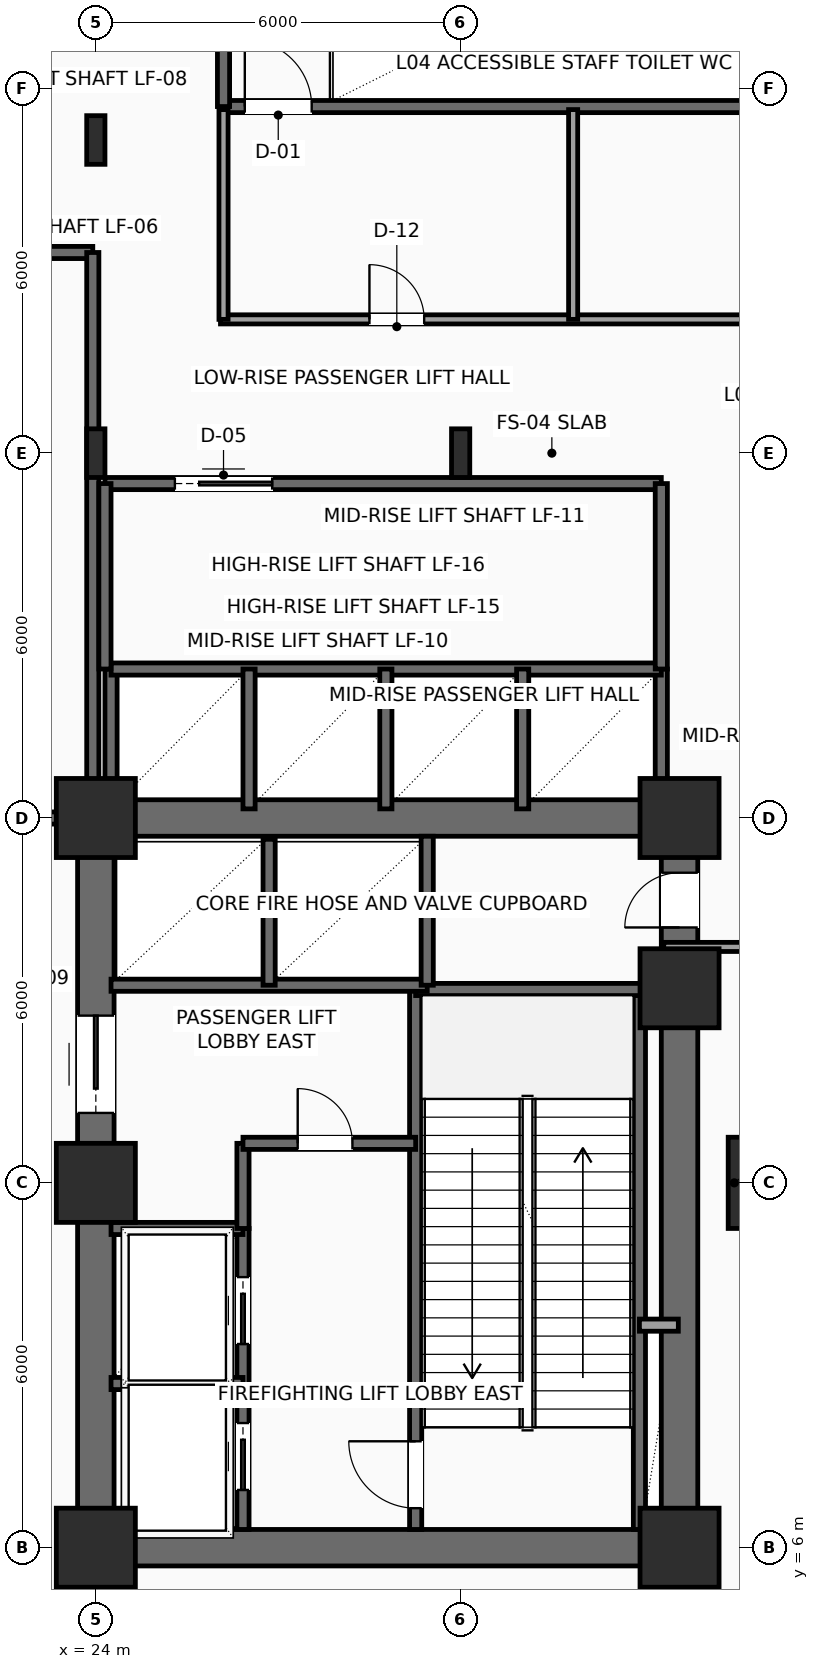
"""IFC4 building model, lengths in metres.
Left out: names, types, materials, properties, quantities, classifications, styles, units other than length and angle.
Written with IfcOpenShell. Run it as: python <this file> out.ifc"""

import sys

from ifc_helpers import new_model, si_unit, direction, frame, frame_2d, origin, origin_2d, place, context, subcontext, project, spatial, rectangle, i_section, extrude, element, fill, save


model = new_model("IFC4")
c1 = context("Model", 3, precision=1e-05, world=origin(), true_north=direction((0.0, 1.0)))
c2 = subcontext(c1, "Body", "Model", "MODEL_VIEW")
j1 = project(units=[si_unit("LENGTHUNIT", "METRE"), si_unit("PLANEANGLEUNIT", "RADIAN")], contexts=[c1])
p1 = place(None, origin())
s1 = spatial("IfcSite", under=j1, at=p1, CompositionType="ELEMENT")
p2 = place(p1, origin())
s2 = spatial("IfcBuilding", under=s1, at=p2, CompositionType="ELEMENT")
p3 = place(p2, frame((0.0, 0.0, 21.9)))
s3 = spatial("IfcBuildingStorey", under=s2, at=p3, CompositionType="ELEMENT", Elevation=21.9)
for number, where, z_axis, x_axis in (
    (1, (24.0, 6.0, 0.0), (0.0, 0.0, 1.0), (1.0, 0.0, 0.0)),
    (2, (24.0, 12.0, 0.0), (0.0, 0.0, 1.0), (1.0, 0.0, 0.0)),
    (3, (24.0, 18.0, 0.0), (0.0, 0.0, 1.0), (1.0, 0.0, 0.0)),
    (4, (33.6, 6.0, 0.0), (0.0, 0.0, 1.0), (1.0, 0.0, 0.0)),
    (5, (33.6, 15.2, 0.0), (0.0, 0.0, 1.0), (1.0, 0.0, 0.0)),
    (6, (33.6, 18.0, 0.0), (0.0, 0.0, 1.0), (1.0, 0.0, 0.0)),
):
    element("IfcColumn", number, at=place(p3, frame(where, z_axis=z_axis, x_axis=x_axis)), inside=s3, PredefinedType="COLUMN", context=c2, shape_type="SweptSolid", body=[
        extrude(rectangle(XDim=1.3, YDim=1.3, at=origin_2d()), origin(), (0.0, 0.0, 1.0), 5.7),
    ])
for number, where, z_axis, x_axis in (
    (7, (24.0, 24.0, 0.0), (0.0, 0.0, 1.0), (1.0, 0.0, 0.0)),
    (8, (24.0, 29.15, 0.0), (0.0, 0.0, 1.0), (1.0, 0.0, 0.0)),
    (9, (30.0, 24.0, 0.0), (0.0, 0.0, 1.0), (1.0, 0.0, 0.0)),
):
    element("IfcColumn", number, at=place(p3, frame(where, z_axis=z_axis, x_axis=x_axis)), inside=s3, PredefinedType="COLUMN", context=c2, shape_type="SweptSolid", body=[
        extrude(i_section(OverallWidth=0.3, OverallDepth=0.8, WebThickness=0.018, FlangeThickness=0.033, FilletRadius=0.03, at=origin_2d()), origin(), (0.0, 0.0, 1.0), 5.35),
    ])
p4 = place(p3, frame((35.15, 12.0, 0.0), z_axis=(0.0, 0.0, 1.0), x_axis=(1.0, 0.0, 0.0)))
e10 = element("IfcColumn", 10, at=p4, inside=s3, PredefinedType="COLUMN", context=c2, shape_type="SweptSolid", body=[
    extrude(rectangle(XDim=1.5, YDim=1.5, at=origin_2d()), origin(), (0.0, 0.0, 1.0), 5.35),
])
for number, where, z_axis, x_axis in (
    (11, (24.0, 6.0, 0.0), (0.0, 0.0, 1.0), (1.0, 0.0, 0.0)),
    (12, (24.0, 18.0, 0.0), (0.0, 0.0, 1.0), (1.0, 0.0, 0.0)),
):
    element("IfcWall", number, at=place(p3, frame(where, z_axis=z_axis, x_axis=x_axis)), inside=s3, PredefinedType="SHEAR", context=c2, shape_type="SweptSolid", body=[
        extrude(rectangle(XDim=9.6, YDim=0.6, at=frame_2d((4.8, 0.0))), origin(), (0.0, 0.0, 1.0), 5.35),
    ])
p5 = place(p3, frame((24.0, 6.0, 0.0), z_axis=(0.0, 0.0, 1.0), x_axis=(0.0, 1.0, 0.0)))
e13 = element("IfcWall", 13, at=p5, inside=s3, PredefinedType="SHEAR", context=c2, shape_type="SweptSolid", body=[
    extrude(rectangle(XDim=12.0, YDim=0.6, at=frame_2d((6.0, 0.0))), origin(), (0.0, 0.0, 1.0), 5.35),
])
p6 = place(p5, frame((7.15, 0.0, 0.0)))
e14 = element("IfcOpeningElement", 14, at=p6, cuts=e13, PredefinedType="OPENING", context=c2, shape_type="SweptSolid", body=[
    extrude(rectangle(XDim=1.6, YDim=2.3, at=frame_2d((0.8, 1.15))), frame((0.0, 0.31, 0.0), z_axis=(0.0, -1.0, 0.0), x_axis=(1.0, 0.0, 0.0)), (0.0, 0.0, 1.0), 0.62),
])
p7 = place(p3, frame((33.6, 6.0, 0.0), z_axis=(0.0, 0.0, 1.0), x_axis=(0.0, 1.0, 0.0)))
e15 = element("IfcWall", 15, at=p7, inside=s3, PredefinedType="SHEAR", context=c2, shape_type="SweptSolid", body=[
    extrude(rectangle(XDim=12.0, YDim=0.6, at=frame_2d((6.0, 0.0))), origin(), (0.0, 0.0, 1.0), 5.35),
])
p8 = place(p7, frame((10.2, 0.0, 0.0)))
e16 = element("IfcOpeningElement", 16, at=p8, cuts=e15, PredefinedType="OPENING", context=c2, shape_type="SweptSolid", body=[
    extrude(rectangle(XDim=0.9, YDim=2.15, at=frame_2d((0.45, 1.075))), frame((0.0, 0.31, 0.0), z_axis=(0.0, -1.0, 0.0), x_axis=(1.0, 0.0, 0.0)), (0.0, 0.0, 1.0), 0.62),
])
p9 = place(p3, frame((29.26, 6.3, 0.0), z_axis=(0.0, 0.0, 1.0), x_axis=(0.0, 1.0, 0.0)))
e17 = element("IfcWall", 17, at=p9, inside=s3, PredefinedType="SHEAR", context=c2, shape_type="SweptSolid", body=[
    extrude(rectangle(XDim=8.88, YDim=0.2, at=frame_2d((4.44, 0.0))), origin(), (0.0, 0.0, 1.0), 5.35),
])
p10 = place(p9, frame((0.35, 0.0, 0.0)))
e18 = element("IfcOpeningElement", 18, at=p10, cuts=e17, PredefinedType="OPENING", context=c2, shape_type="SweptSolid", body=[
    extrude(rectangle(XDim=1.1, YDim=2.2, at=frame_2d((0.55, 1.1))), frame((0.0, 0.11, 0.0), z_axis=(0.0, -1.0, 0.0), x_axis=(1.0, 0.0, 0.0)), (0.0, 0.0, 1.0), 0.22),
])
p11 = place(p3, frame((32.94, 6.3, 0.0), z_axis=(0.0, 0.0, 1.0), x_axis=(0.0, 1.0, 0.0)))
e19 = element("IfcWall", 19, at=p11, inside=s3, PredefinedType="SHEAR", context=c2, shape_type="SweptSolid", body=[
    extrude(rectangle(XDim=8.88, YDim=0.2, at=frame_2d((4.44, 0.0))), origin(), (0.0, 0.0, 1.0), 5.35),
])
p12 = place(p3, frame((29.26, 15.18, 0.0), z_axis=(0.0, 0.0, 1.0), x_axis=(1.0, 0.0, 0.0)))
e20 = element("IfcWall", 20, at=p12, inside=s3, PredefinedType="SHEAR", context=c2, shape_type="SweptSolid", body=[
    extrude(rectangle(XDim=4.04, YDim=0.2, at=frame_2d((2.02, 0.0))), origin(), (0.0, 0.0, 1.0), 5.35),
])
p13 = place(p3, frame((26.42, 6.3, 0.0), z_axis=(0.0, 0.0, 1.0), x_axis=(0.0, 1.0, 0.0)))
e21 = element("IfcWall", 21, at=p13, inside=s3, PredefinedType="SHEAR", context=c2, shape_type="SweptSolid", body=[
    extrude(rectangle(XDim=4.95, YDim=0.2, at=frame_2d((2.475, 0.0))), origin(), (0.0, 0.0, 1.0), 5.35),
])
p14 = place(p13, frame((0.65, 0.0, 0.0)))
e22 = element("IfcOpeningElement", 22, at=p14, cuts=e21, PredefinedType="OPENING", context=c2, shape_type="SweptSolid", body=[
    extrude(rectangle(XDim=1.1, YDim=2.2, at=frame_2d((0.55, 1.1))), frame((0.0, 0.11, 0.0), z_axis=(0.0, -1.0, 0.0), x_axis=(1.0, 0.0, 0.0)), (0.0, 0.0, 1.0), 0.22),
])
p15 = place(p13, frame((3.05, 0.0, 0.0)))
e23 = element("IfcOpeningElement", 23, at=p15, cuts=e21, PredefinedType="OPENING", context=c2, shape_type="SweptSolid", body=[
    extrude(rectangle(XDim=1.1, YDim=2.2, at=frame_2d((0.55, 1.1))), frame((0.0, 0.11, 0.0), z_axis=(0.0, -1.0, 0.0), x_axis=(1.0, 0.0, 0.0)), (0.0, 0.0, 1.0), 0.22),
])
for number, where, z_axis, x_axis in (
    (24, (24.25, 8.7, 0.0), (0.0, 0.0, 1.0), (1.0, 0.0, 0.0)),
    (25, (24.25, 11.25, 0.0), (0.0, 0.0, 1.0), (1.0, 0.0, 0.0)),
):
    element("IfcWall", number, at=place(p3, frame(where, z_axis=z_axis, x_axis=x_axis)), inside=s3, PredefinedType="SHEAR", context=c2, shape_type="SweptSolid", body=[
        extrude(rectangle(XDim=2.17, YDim=0.2, at=frame_2d((1.085, 0.0))), origin(), (0.0, 0.0, 1.0), 5.35),
    ])
p16 = place(p3, frame((26.42, 11.25, 0.0), z_axis=(0.0, 0.0, 1.0), x_axis=(0.0, 1.0, 0.0)))
e26 = element("IfcWall", 26, at=p16, inside=s3, PredefinedType="SHEAR", context=c2, shape_type="SweptSolid", body=[
    extrude(rectangle(XDim=1.4, YDim=0.2, at=frame_2d((0.7, 0.0))), origin(), (0.0, 0.0, 1.0), 5.35),
])
p17 = place(p3, frame((26.42, 12.65, 0.0), z_axis=(0.0, 0.0, 1.0), x_axis=(1.0, 0.0, 0.0)))
e27 = element("IfcWall", 27, at=p17, inside=s3, PredefinedType="SHEAR", context=c2, shape_type="SweptSolid", body=[
    extrude(rectangle(XDim=2.84, YDim=0.2, at=frame_2d((1.42, 0.0))), origin(), (0.0, 0.0, 1.0), 5.35),
])
p18 = place(p17, frame((0.9, 0.0, 0.0)))
e28 = element("IfcOpeningElement", 28, at=p18, cuts=e27, PredefinedType="OPENING", context=c2, shape_type="SweptSolid", body=[
    extrude(rectangle(XDim=0.9, YDim=2.15, at=frame_2d((0.45, 1.075))), frame((0.0, 0.11, 0.0), z_axis=(0.0, -1.0, 0.0), x_axis=(1.0, 0.0, 0.0)), (0.0, 0.0, 1.0), 0.22),
])
p19 = place(p3, frame((32.94, 9.66, 0.0), z_axis=(0.0, 0.0, 1.0), x_axis=(1.0, 0.0, 0.0)))
e29 = element("IfcWall", 29, at=p19, inside=s3, PredefinedType="SOLIDWALL", context=c2, shape_type="SweptSolid", body=[
    extrude(rectangle(XDim=0.64, YDim=0.2, at=frame_2d((0.32, 0.0))), origin(), (0.0, 0.0, 1.0), 5.35),
])
p20 = place(p3, frame((24.25, 15.25, 0.0), z_axis=(0.0, 0.0, 1.0), x_axis=(1.0, 0.0, 0.0)))
e30 = element("IfcWall", 30, at=p20, inside=s3, PredefinedType="SHEAR", context=c2, shape_type="SweptSolid", body=[
    extrude(rectangle(XDim=5.2, YDim=0.2, at=frame_2d((2.6, 0.0))), origin(), (0.0, 0.0, 1.0), 5.35),
])
p21 = place(p3, frame((26.85, 15.25, 0.0), z_axis=(0.0, 0.0, 1.0), x_axis=(0.0, 1.0, 0.0)))
e31 = element("IfcWall", 31, at=p21, inside=s3, PredefinedType="SHEAR", context=c2, shape_type="SweptSolid", body=[
    extrude(rectangle(XDim=2.4, YDim=0.2, at=frame_2d((1.2, 0.0))), origin(), (0.0, 0.0, 1.0), 5.35),
])
p22 = place(p3, frame((29.45, 15.25, 0.0), z_axis=(0.0, 0.0, 1.0), x_axis=(0.0, 1.0, 0.0)))
e32 = element("IfcWall", 32, at=p22, inside=s3, PredefinedType="SHEAR", context=c2, shape_type="SweptSolid", body=[
    extrude(rectangle(XDim=2.45, YDim=0.2, at=frame_2d((1.225, 0.0))), origin(), (0.0, 0.0, 1.0), 5.35),
])
p23 = place(p3, frame((20.45, 18.0, 0.0), z_axis=(0.0, 0.0, 1.0), x_axis=(1.0, 0.0, 0.0)))
e33 = element("IfcWall", 33, at=p23, inside=s3, PredefinedType="SHEAR", context=c2, shape_type="SweptSolid", body=[
    extrude(rectangle(XDim=3.5, YDim=0.2, at=frame_2d((1.75, 0.0))), origin(), (0.0, 0.0, 1.0), 5.35),
])
p24 = place(p23, frame((0.95, 0.0, 0.0)))
e34 = element("IfcOpeningElement", 34, at=p24, cuts=e33, PredefinedType="OPENING", context=c2, shape_type="SweptSolid", body=[
    extrude(rectangle(XDim=1.6, YDim=2.3, at=frame_2d((0.8, 1.15))), frame((0.0, 0.11, 0.0), z_axis=(0.0, -1.0, 0.0), x_axis=(1.0, 0.0, 0.0)), (0.0, 0.0, 1.0), 0.22),
])
p25 = place(p3, frame((20.45, 27.3, 0.0), z_axis=(0.0, 0.0, 1.0), x_axis=(1.0, 0.0, 0.0)))
e35 = element("IfcWall", 35, at=p25, inside=s3, PredefinedType="SHEAR", context=c2, shape_type="SweptSolid", body=[
    extrude(rectangle(XDim=3.5, YDim=0.2, at=frame_2d((1.75, 0.0))), origin(), (0.0, 0.0, 1.0), 5.35),
])
p26 = place(p3, frame((23.95, 18.0, 0.0), z_axis=(0.0, 0.0, 1.0), x_axis=(0.0, 1.0, 0.0)))
e36 = element("IfcWall", 36, at=p26, inside=s3, PredefinedType="SHEAR", context=c2, shape_type="SweptSolid", body=[
    extrude(rectangle(XDim=9.3, YDim=0.2, at=frame_2d((4.65, 0.0))), origin(), (0.0, 0.0, 1.0), 5.35),
])
for number, where, z_axis, x_axis in (
    (37, (33.3, 18.1, 0.0), (0.0, 0.0, 1.0), (0.0, 1.0, 0.0)),
    (38, (24.25, 18.1, 0.0), (0.0, 0.0, 1.0), (0.0, 1.0, 0.0)),
):
    element("IfcWall", number, at=place(p3, frame(where, z_axis=z_axis, x_axis=x_axis)), inside=s3, PredefinedType="SHEAR", context=c2, shape_type="SweptSolid", body=[
        extrude(rectangle(XDim=2.35, YDim=0.2, at=frame_2d((1.175, 0.0))), origin(), (0.0, 0.0, 1.0), 5.35),
    ])
p27 = place(p3, frame((24.25, 20.45, 0.0), z_axis=(0.0, 0.0, 1.0), x_axis=(1.0, 0.0, 0.0)))
e39 = element("IfcWall", 39, at=p27, inside=s3, PredefinedType="SHEAR", context=c2, shape_type="SweptSolid", body=[
    extrude(rectangle(XDim=9.05, YDim=0.2, at=frame_2d((4.525, 0.0))), origin(), (0.0, 0.0, 1.0), 5.35),
])
for number, where, z_axis, x_axis in (
    (40, (26.52, 18.15, 0.0), (0.0, 0.0, 1.0), (0.0, 1.0, 0.0)),
    (41, (28.77, 18.15, 0.0), (0.0, 0.0, 1.0), (0.0, 1.0, 0.0)),
    (42, (31.02, 18.15, 0.0), (0.0, 0.0, 1.0), (0.0, 1.0, 0.0)),
):
    element("IfcWall", number, at=place(p3, frame(where, z_axis=z_axis, x_axis=x_axis)), inside=s3, PredefinedType="SHEAR", context=c2, shape_type="SweptSolid", body=[
        extrude(rectangle(XDim=2.3, YDim=0.2, at=frame_2d((1.15, 0.0))), origin(), (0.0, 0.0, 1.0), 5.35),
    ])
p28 = place(p3, frame((24.15, 23.5, 0.0), z_axis=(0.0, 0.0, 1.0), x_axis=(1.0, 0.0, 0.0)))
e43 = element("IfcWall", 43, at=p28, inside=s3, PredefinedType="SHEAR", context=c2, shape_type="SweptSolid", body=[
    extrude(rectangle(XDim=9.15, YDim=0.2, at=frame_2d((4.575, 0.0))), origin(), (0.0, 0.0, 1.0), 5.35),
])
p29 = place(p28, frame((1.15, 0.0, 0.0)))
e44 = element("IfcOpeningElement", 44, at=p29, cuts=e43, PredefinedType="OPENING", context=c2, shape_type="SweptSolid", body=[
    extrude(rectangle(XDim=1.6, YDim=2.3, at=frame_2d((0.8, 1.15))), frame((0.0, 0.11, 0.0), z_axis=(0.0, -1.0, 0.0), x_axis=(1.0, 0.0, 0.0)), (0.0, 0.0, 1.0), 0.22),
])
for number, where, z_axis, x_axis in (
    (45, (33.3, 20.45, 0.0), (0.0, 0.0, 1.0), (0.0, 1.0, 0.0)),
    (46, (24.15, 20.45, 0.0), (0.0, 0.0, 1.0), (0.0, 1.0, 0.0)),
):
    element("IfcWall", number, at=place(p3, frame(where, z_axis=z_axis, x_axis=x_axis)), inside=s3, PredefinedType="SHEAR", context=c2, shape_type="SweptSolid", body=[
        extrude(rectangle(XDim=3.05, YDim=0.2, at=frame_2d((1.525, 0.0))), origin(), (0.0, 0.0, 1.0), 5.35),
    ])
p30 = place(p3, frame((26.1, 29.7, 0.0), z_axis=(0.0, 0.0, 1.0), x_axis=(1.0, 0.0, 0.0)))
e47 = element("IfcWall", 47, at=p30, inside=s3, PredefinedType="SHEAR", context=c2, shape_type="SweptSolid", body=[
    extrude(rectangle(XDim=9.05, YDim=0.2, at=frame_2d((4.525, 0.0))), origin(), (0.0, 0.0, 1.0), 5.35),
])
p31 = place(p30, frame((0.35, 0.0, 0.0)))
e48 = element("IfcOpeningElement", 48, at=p31, cuts=e47, PredefinedType="OPENING", context=c2, shape_type="SweptSolid", body=[
    extrude(rectangle(XDim=1.1, YDim=2.2, at=frame_2d((0.55, 1.1))), frame((0.0, 0.11, 0.0), z_axis=(0.0, -1.0, 0.0), x_axis=(1.0, 0.0, 0.0)), (0.0, 0.0, 1.0), 0.22),
])
p32 = place(p3, frame((26.1, 29.7, 0.0), z_axis=(0.0, 0.0, 1.0), x_axis=(0.0, 1.0, 0.0)))
e49 = element("IfcWall", 49, at=p32, inside=s3, PredefinedType="SHEAR", context=c2, shape_type="SweptSolid", body=[
    extrude(rectangle(XDim=3.76, YDim=0.2, at=frame_2d((1.88, 0.0))), origin(), (0.0, 0.0, 1.0), 5.35),
])
p33 = place(p3, frame((36.15, 15.88, 0.0), z_axis=(0.0, 0.0, 1.0), x_axis=(-1.0, 0.0, 0.0)))
e50 = element("IfcWall", 50, at=p33, inside=s3, PredefinedType="PARTITIONING", context=c2, shape_type="SweptSolid", body=[
    extrude(rectangle(XDim=2.81, YDim=0.15, at=frame_2d((1.405, 0.0))), origin(), (0.0, 0.0, 1.0), 5.35),
])
p34 = place(p3, frame((26.05, 26.2, 0.0), z_axis=(0.0, 0.0, 1.0), x_axis=(1.0, 0.0, 0.0)))
e51 = element("IfcWall", 51, at=p34, inside=s3, PredefinedType="PARTITIONING", context=c2, shape_type="SweptSolid", body=[
    extrude(rectangle(XDim=33.55, YDim=0.15, at=frame_2d((16.775, 0.0))), origin(), (0.0, 0.0, 1.0), 5.35),
])
p35 = place(p34, frame((2.45, 0.0, 0.0)))
e52 = element("IfcOpeningElement", 52, at=p35, cuts=e51, PredefinedType="OPENING", context=c2, shape_type="SweptSolid", body=[
    extrude(rectangle(XDim=0.9, YDim=2.1, at=frame_2d((0.45, 1.05))), frame((0.0, 0.085, 0.0), z_axis=(0.0, -1.0, 0.0), x_axis=(1.0, 0.0, 0.0)), (0.0, 0.0, 1.0), 0.17),
])
p36 = place(p34, frame((11.7, 0.0, 0.0)))
e53 = element("IfcOpeningElement", 53, at=p36, cuts=e51, PredefinedType="OPENING", context=c2, shape_type="SweptSolid", body=[
    extrude(rectangle(XDim=0.95, YDim=2.15, at=frame_2d((0.475, 1.075))), frame((0.0, 0.085, 0.0), z_axis=(0.0, -1.0, 0.0), x_axis=(1.0, 0.0, 0.0)), (0.0, 0.0, 1.0), 0.17),
])
p37 = place(p34, frame((18.375, 0.0, 0.0)))
e54 = element("IfcOpeningElement", 54, at=p37, cuts=e51, PredefinedType="OPENING", context=c2, shape_type="SweptSolid", body=[
    extrude(rectangle(XDim=0.95, YDim=2.15, at=frame_2d((0.475, 1.075))), frame((0.0, 0.085, 0.0), z_axis=(0.0, -1.0, 0.0), x_axis=(1.0, 0.0, 0.0)), (0.0, 0.0, 1.0), 0.17),
])
p38 = place(p34, frame((25.375, 0.0, 0.0)))
e55 = element("IfcOpeningElement", 55, at=p38, cuts=e51, PredefinedType="OPENING", context=c2, shape_type="SweptSolid", body=[
    extrude(rectangle(XDim=0.95, YDim=2.15, at=frame_2d((0.475, 1.075))), frame((0.0, 0.085, 0.0), z_axis=(0.0, -1.0, 0.0), x_axis=(1.0, 0.0, 0.0)), (0.0, 0.0, 1.0), 0.17),
])
p39 = place(p34, frame((30.875, 0.0, 0.0)))
e56 = element("IfcOpeningElement", 56, at=p39, cuts=e51, PredefinedType="OPENING", context=c2, shape_type="SweptSolid", body=[
    extrude(rectangle(XDim=0.95, YDim=2.15, at=frame_2d((0.475, 1.075))), frame((0.0, 0.085, 0.0), z_axis=(0.0, -1.0, 0.0), x_axis=(1.0, 0.0, 0.0)), (0.0, 0.0, 1.0), 0.17),
])
for number, where, z_axis, x_axis in (
    (57, (26.1, 26.2, 0.0), (0.0, 0.0, 1.0), (0.0, 1.0, 0.0)),
    (58, (31.85, 26.2, 0.0), (0.0, 0.0, 1.0), (0.0, 1.0, 0.0)),
):
    element("IfcWall", number, at=place(p3, frame(where, z_axis=z_axis, x_axis=x_axis)), inside=s3, PredefinedType="PARTITIONING", context=c2, shape_type="SweptSolid", body=[
        extrude(rectangle(XDim=3.45, YDim=0.15, at=frame_2d((1.725, 0.0))), origin(), (0.0, 0.0, 1.0), 5.35),
    ])
p40 = place(p6, origin())
e59 = element("IfcDoor", 59, at=p40, inside=s3, OperationType="DOUBLE_DOOR_SLIDING", PredefinedType="DOOR", context=c2, shape_type="SweptSolid", body=[
    extrude(rectangle(XDim=1.6, YDim=2.3, at=frame_2d((0.8, 1.15))), frame((0.0, 0.025, 0.0), z_axis=(0.0, -1.0, 0.0), x_axis=(1.0, 0.0, 0.0)), (0.0, 0.0, 1.0), 0.05),
])
fill(e14, e59)
p41 = place(p8, origin())
e60 = element("IfcDoor", 60, at=p41, inside=s3, OperationType="SINGLE_SWING_LEFT", PredefinedType="DOOR", context=c2, shape_type="SweptSolid", body=[
    extrude(rectangle(XDim=0.9, YDim=2.15, at=frame_2d((0.45, 1.075))), frame((0.0, 0.025, 0.0), z_axis=(0.0, -1.0, 0.0), x_axis=(1.0, 0.0, 0.0)), (0.0, 0.0, 1.0), 0.05),
])
fill(e16, e60)
p42 = place(p10, origin())
e61 = element("IfcDoor", 61, at=p42, inside=s3, OperationType="SINGLE_SWING_RIGHT", PredefinedType="DOOR", context=c2, shape_type="SweptSolid", body=[
    extrude(rectangle(XDim=1.1, YDim=2.2, at=frame_2d((0.55, 1.1))), frame((0.0, 0.025, 0.0), z_axis=(0.0, -1.0, 0.0), x_axis=(1.0, 0.0, 0.0)), (0.0, 0.0, 1.0), 0.05),
])
fill(e18, e61)
p43 = place(p14, origin())
e62 = element("IfcDoor", 62, at=p43, inside=s3, OperationType="SLIDING_TO_LEFT", PredefinedType="DOOR", context=c2, shape_type="SweptSolid", body=[
    extrude(rectangle(XDim=1.1, YDim=2.2, at=frame_2d((0.55, 1.1))), frame((0.0, 0.025, 0.0), z_axis=(0.0, -1.0, 0.0), x_axis=(1.0, 0.0, 0.0)), (0.0, 0.0, 1.0), 0.05),
])
fill(e22, e62)
p44 = place(p15, origin())
e63 = element("IfcDoor", 63, at=p44, inside=s3, OperationType="SLIDING_TO_LEFT", PredefinedType="DOOR", context=c2, shape_type="SweptSolid", body=[
    extrude(rectangle(XDim=1.1, YDim=2.2, at=frame_2d((0.55, 1.1))), frame((0.0, 0.025, 0.0), z_axis=(0.0, -1.0, 0.0), x_axis=(1.0, 0.0, 0.0)), (0.0, 0.0, 1.0), 0.05),
])
fill(e23, e63)
p45 = place(p18, origin())
e64 = element("IfcDoor", 64, at=p45, inside=s3, OperationType="SINGLE_SWING_LEFT", PredefinedType="DOOR", context=c2, shape_type="SweptSolid", body=[
    extrude(rectangle(XDim=0.9, YDim=2.15, at=frame_2d((0.45, 1.075))), frame((0.0, 0.025, 0.0), z_axis=(0.0, -1.0, 0.0), x_axis=(1.0, 0.0, 0.0)), (0.0, 0.0, 1.0), 0.05),
])
fill(e28, e64)
p46 = place(p29, origin())
e65 = element("IfcDoor", 65, at=p46, inside=s3, OperationType="DOUBLE_DOOR_SLIDING", PredefinedType="DOOR", context=c2, shape_type="SweptSolid", body=[
    extrude(rectangle(XDim=1.6, YDim=2.3, at=frame_2d((0.8, 1.15))), frame((0.0, 0.025, 0.0), z_axis=(0.0, -1.0, 0.0), x_axis=(1.0, 0.0, 0.0)), (0.0, 0.0, 1.0), 0.05),
])
fill(e44, e65)
p47 = place(p31, origin())
e66 = element("IfcDoor", 66, at=p47, inside=s3, OperationType="SINGLE_SWING_LEFT", PredefinedType="DOOR", context=c2, shape_type="SweptSolid", body=[
    extrude(rectangle(XDim=1.1, YDim=2.2, at=frame_2d((0.55, 1.1))), frame((0.0, 0.025, 0.0), z_axis=(0.0, -1.0, 0.0), x_axis=(1.0, 0.0, 0.0)), (0.0, 0.0, 1.0), 0.05),
])
fill(e48, e66)
p48 = place(p35, origin())
e67 = element("IfcDoor", 67, at=p48, inside=s3, OperationType="SINGLE_SWING_LEFT", PredefinedType="DOOR", context=c2, shape_type="SweptSolid", body=[
    extrude(rectangle(XDim=0.9, YDim=2.1, at=frame_2d((0.45, 1.05))), frame((0.0, 0.025, 0.0), z_axis=(0.0, -1.0, 0.0), x_axis=(1.0, 0.0, 0.0)), (0.0, 0.0, 1.0), 0.05),
])
fill(e52, e67)
save(model, sys.argv[1])
